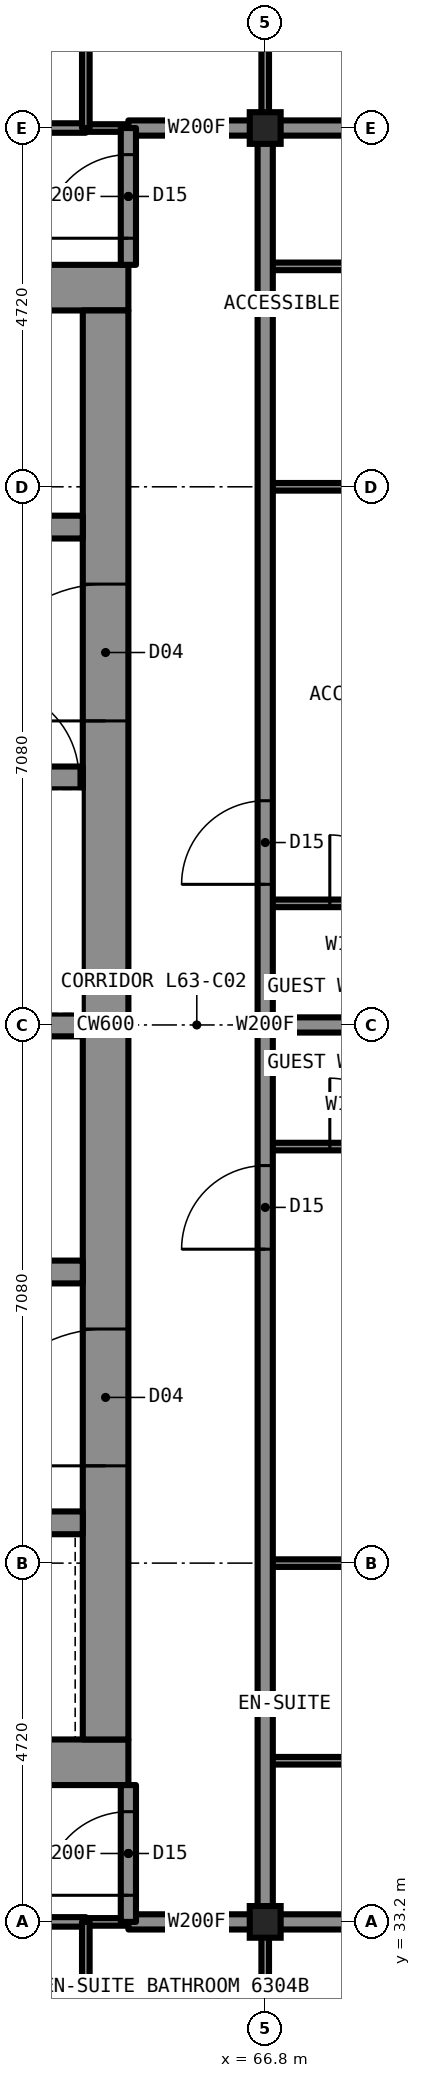
"""IFC4 building model, lengths in metres.
Left out: names, types, materials, properties, quantities, classifications, styles, units other than length and angle.
Written with IfcOpenShell. Run it as: python <this file> out.ifc"""

import sys

from ifc_helpers import new_model, si_unit, direction, frame, frame_2d, origin, origin_2d, place, context, subcontext, project, spatial, rectangle, i_section, extrude, element, fill, save


model = new_model("IFC4")
c1 = context("Model", 3, precision=1e-05, world=origin(), true_north=direction((0.0, 1.0)))
c2 = subcontext(c1, "Body", "Model", "MODEL_VIEW")
j1 = project(units=[si_unit("LENGTHUNIT", "METRE"), si_unit("PLANEANGLEUNIT", "RADIAN")], contexts=[c1])
p1 = place(None, origin())
s1 = spatial("IfcSite", under=j1, at=p1, CompositionType="ELEMENT")
p2 = place(p1, origin())
s2 = spatial("IfcBuilding", under=s1, at=p2, CompositionType="ELEMENT")
p3 = place(p2, frame((0.0, 0.0, 226.7)))
s3 = spatial("IfcBuildingStorey", under=s2, at=p3, CompositionType="ELEMENT", Elevation=226.7)
for number, where, z_axis, x_axis in (
    (1, (66.8, 33.2, 0.0), (0.0, 0.0, 1.0), (1.0, 0.0, 0.0)),
    (2, (66.8, 56.8, 0.0), (0.0, 0.0, 1.0), (1.0, 0.0, 0.0)),
):
    element("IfcColumn", number, at=place(p3, frame(where, z_axis=z_axis, x_axis=x_axis)), inside=s3, PredefinedType="COLUMN", context=c2, shape_type="SweptSolid", body=[
        extrude(i_section(OverallWidth=0.406, OverallDepth=0.417, WebThickness=0.03, FlangeThickness=0.048, at=origin_2d()), origin(), (0.0, 0.0, 1.0), 3.5),
    ])
for number, where, z_axis, x_axis in (
    (3, (45.0, 54.7, 0.0), (0.0, 0.0, 1.0), (1.0, 0.0, 0.0)),
    (4, (45.0, 35.3, 0.0), (0.0, 0.0, 1.0), (1.0, 0.0, 0.0)),
):
    element("IfcWall", number, at=place(p3, frame(where, z_axis=z_axis, x_axis=x_axis)), inside=s3, PredefinedType="SHEAR", context=c2, shape_type="SweptSolid", body=[
        extrude(rectangle(XDim=20.0, YDim=0.6, at=frame_2d((10.0, 0.0))), origin(), (0.0, 0.0, 1.0), 3.5),
    ])
p4 = place(p3, frame((64.7, 35.6, 0.0), z_axis=(0.0, 0.0, 1.0), x_axis=(0.0, 1.0, 0.0)))
e5 = element("IfcWall", 5, at=p4, inside=s3, PredefinedType="SHEAR", context=c2, shape_type="SweptSolid", body=[
    extrude(rectangle(XDim=18.8, YDim=0.6, at=frame_2d((9.4, 0.0))), origin(), (0.0, 0.0, 1.0), 3.5),
])
p5 = place(p4, frame((13.4, 0.0, 0.0)))
e6 = element("IfcOpeningElement", 6, at=p5, cuts=e5, PredefinedType="OPENING", context=c2, shape_type="SweptSolid", body=[
    extrude(rectangle(XDim=1.8, YDim=2.2, at=frame_2d((0.9, 1.1))), frame((0.0, 0.31, 0.0), z_axis=(0.0, -1.0, 0.0), x_axis=(1.0, 0.0, 0.0)), (0.0, 0.0, 1.0), 0.62),
])
p6 = place(p4, frame((3.6, 0.0, 0.0)))
e7 = element("IfcOpeningElement", 7, at=p6, cuts=e5, PredefinedType="OPENING", context=c2, shape_type="SweptSolid", body=[
    extrude(rectangle(XDim=1.8, YDim=2.2, at=frame_2d((0.9, 1.1))), frame((0.0, 0.31, 0.0), z_axis=(0.0, -1.0, 0.0), x_axis=(1.0, 0.0, 0.0)), (0.0, 0.0, 1.0), 0.62),
])
p7 = place(p3, frame((45.6, 51.55, 0.0), z_axis=(0.0, 0.0, 1.0), x_axis=(1.0, 0.0, 0.0)))
e8 = element("IfcWall", 8, at=p7, inside=s3, PredefinedType="SHEAR", context=c2, shape_type="SweptSolid", body=[
    extrude(rectangle(XDim=18.8, YDim=0.3, at=frame_2d((9.4, 0.0))), origin(), (0.0, 0.0, 1.0), 3.5),
])
p8 = place(p7, frame((4.8, 0.0, 0.0)))
e9 = element("IfcOpeningElement", 9, at=p8, cuts=e8, PredefinedType="OPENING", context=c2, shape_type="SweptSolid", body=[
    extrude(rectangle(XDim=1.0, YDim=2.1, at=frame_2d((0.5, 1.05))), frame((0.0, 0.16, 0.0), z_axis=(0.0, -1.0, 0.0), x_axis=(1.0, 0.0, 0.0)), (0.0, 0.0, 1.0), 0.32),
])
p9 = place(p7, frame((11.6, 0.0, 0.0)))
e10 = element("IfcOpeningElement", 10, at=p9, cuts=e8, PredefinedType="OPENING", context=c2, shape_type="SweptSolid", body=[
    extrude(rectangle(XDim=1.1, YDim=2.2, at=frame_2d((0.55, 1.1))), frame((0.0, 0.16, 0.0), z_axis=(0.0, -1.0, 0.0), x_axis=(1.0, 0.0, 0.0)), (0.0, 0.0, 1.0), 0.32),
])
p10 = place(p7, frame((14.3, 0.0, 0.0)))
e11 = element("IfcOpeningElement", 11, at=p10, cuts=e8, PredefinedType="OPENING", context=c2, shape_type="SweptSolid", body=[
    extrude(rectangle(XDim=1.1, YDim=2.2, at=frame_2d((0.55, 1.1))), frame((0.0, 0.16, 0.0), z_axis=(0.0, -1.0, 0.0), x_axis=(1.0, 0.0, 0.0)), (0.0, 0.0, 1.0), 0.32),
])
p11 = place(p3, frame((45.6, 38.45, 0.0), z_axis=(0.0, 0.0, 1.0), x_axis=(1.0, 0.0, 0.0)))
e12 = element("IfcWall", 12, at=p11, inside=s3, PredefinedType="SHEAR", context=c2, shape_type="SweptSolid", body=[
    extrude(rectangle(XDim=18.8, YDim=0.3, at=frame_2d((9.4, 0.0))), origin(), (0.0, 0.0, 1.0), 3.5),
])
p12 = place(p11, frame((0.7, 0.0, 0.0)))
e13 = element("IfcOpeningElement", 13, at=p12, cuts=e12, PredefinedType="OPENING", context=c2, shape_type="SweptSolid", body=[
    extrude(rectangle(XDim=1.1, YDim=2.2, at=frame_2d((0.55, 1.1))), frame((0.0, 0.16, 0.0), z_axis=(0.0, -1.0, 0.0), x_axis=(1.0, 0.0, 0.0)), (0.0, 0.0, 1.0), 0.32),
])
p13 = place(p11, frame((3.4, 0.0, 0.0)))
e14 = element("IfcOpeningElement", 14, at=p13, cuts=e12, PredefinedType="OPENING", context=c2, shape_type="SweptSolid", body=[
    extrude(rectangle(XDim=1.1, YDim=2.2, at=frame_2d((0.55, 1.1))), frame((0.0, 0.16, 0.0), z_axis=(0.0, -1.0, 0.0), x_axis=(1.0, 0.0, 0.0)), (0.0, 0.0, 1.0), 0.32),
])
p14 = place(p11, frame((6.1, 0.0, 0.0)))
e15 = element("IfcOpeningElement", 15, at=p14, cuts=e12, PredefinedType="OPENING", context=c2, shape_type="SweptSolid", body=[
    extrude(rectangle(XDim=1.1, YDim=2.2, at=frame_2d((0.55, 1.1))), frame((0.0, 0.16, 0.0), z_axis=(0.0, -1.0, 0.0), x_axis=(1.0, 0.0, 0.0)), (0.0, 0.0, 1.0), 0.32),
])
p15 = place(p11, frame((8.8, 0.0, 0.0)))
e16 = element("IfcOpeningElement", 16, at=p15, cuts=e12, PredefinedType="OPENING", context=c2, shape_type="SweptSolid", body=[
    extrude(rectangle(XDim=1.1, YDim=2.2, at=frame_2d((0.55, 1.1))), frame((0.0, 0.16, 0.0), z_axis=(0.0, -1.0, 0.0), x_axis=(1.0, 0.0, 0.0)), (0.0, 0.0, 1.0), 0.32),
])
p16 = place(p3, frame((56.2, 48.25, 0.0), z_axis=(0.0, 0.0, 1.0), x_axis=(1.0, 0.0, 0.0)))
e17 = element("IfcWall", 17, at=p16, inside=s3, PredefinedType="SHEAR", context=c2, shape_type="SweptSolid", body=[
    extrude(rectangle(XDim=8.2, YDim=0.3, at=frame_2d((4.1, 0.0))), origin(), (0.0, 0.0, 1.0), 3.5),
])
p17 = place(p16, frame((6.95, 0.0, 0.0)))
e18 = element("IfcOpeningElement", 18, at=p17, cuts=e17, PredefinedType="OPENING", context=c2, shape_type="SweptSolid", body=[
    extrude(rectangle(XDim=1.2, YDim=2.2, at=frame_2d((0.6, 1.1))), frame((0.0, 0.16, 0.0), z_axis=(0.0, -1.0, 0.0), x_axis=(1.0, 0.0, 0.0)), (0.0, 0.0, 1.0), 0.32),
])
p18 = place(p3, frame((56.2, 41.75, 0.0), z_axis=(0.0, 0.0, 1.0), x_axis=(1.0, 0.0, 0.0)))
e19 = element("IfcWall", 19, at=p18, inside=s3, PredefinedType="SHEAR", context=c2, shape_type="SweptSolid", body=[
    extrude(rectangle(XDim=8.2, YDim=0.3, at=frame_2d((4.1, 0.0))), origin(), (0.0, 0.0, 1.0), 3.5),
])
p19 = place(p18, frame((3.3, 0.0, 0.0)))
e20 = element("IfcOpeningElement", 20, at=p19, cuts=e19, PredefinedType="OPENING", context=c2, shape_type="SweptSolid", body=[
    extrude(rectangle(XDim=1.0, YDim=2.1, at=frame_2d((0.5, 1.05))), frame((0.0, 0.16, 0.0), z_axis=(0.0, -1.0, 0.0), x_axis=(1.0, 0.0, 0.0)), (0.0, 0.0, 1.0), 0.32),
])
p20 = place(p3, frame((56.5, 45.0, 0.0), z_axis=(0.0, 0.0, 1.0), x_axis=(1.0, 0.0, 0.0)))
e21 = element("IfcWall", 21, at=p20, inside=s3, PredefinedType="SHEAR", context=c2, shape_type="SweptSolid", body=[
    extrude(rectangle(XDim=7.9, YDim=0.3, at=frame_2d((3.95, 0.0))), origin(), (0.0, 0.0, 1.0), 3.5),
])
p21 = place(p3, frame((66.8, 43.4, 0.0), z_axis=(0.0, 0.0, 1.0), x_axis=(1.0, 0.0, 0.0)))
e22 = element("IfcWall", 22, at=p21, inside=s3, PredefinedType="PARTITIONING", context=c2, shape_type="SweptSolid", body=[
    extrude(rectangle(XDim=2.2, YDim=0.1, at=frame_2d((1.1, 0.0))), origin(), (0.0, 0.0, 1.0), 3.33),
])
p22 = place(p21, frame((0.85, 0.0, 0.0)))
e23 = element("IfcOpeningElement", 23, at=p22, cuts=e22, PredefinedType="OPENING", context=c2, shape_type="SweptSolid", body=[
    extrude(rectangle(XDim=0.9, YDim=2.1, at=frame_2d((0.45, 1.05))), frame((0.0, 0.06, 0.0), z_axis=(0.0, -1.0, 0.0), x_axis=(1.0, 0.0, 0.0)), (0.0, 0.0, 1.0), 0.12),
])
p23 = place(p3, frame((64.44, 33.2, 0.0), z_axis=(0.0, 0.0, 1.0), x_axis=(1.0, 0.0, 0.0)))
e24 = element("IfcWall", 24, at=p23, inside=s3, PredefinedType="PARTITIONING", context=c2, shape_type="SweptSolid", body=[
    extrude(rectangle(XDim=0.56, YDim=0.1, at=frame_2d((0.28, 0.0))), origin(), (0.0, 0.0, 1.0), 3.33),
])
p24 = place(p3, frame((65.0, 33.2, 0.0), z_axis=(0.0, 0.0, 1.0), x_axis=(1.0, 0.0, 0.0)))
e25 = element("IfcWall", 25, at=p24, inside=s3, PredefinedType="PARTITIONING", context=c2, shape_type="SweptSolid", body=[
    extrude(rectangle(XDim=1.8, YDim=0.2, at=frame_2d((0.9, 0.0))), origin(), (0.0, 0.0, 1.0), 3.33),
])
p25 = place(p3, frame((66.8, 33.2, 0.0), z_axis=(0.0, 0.0, 1.0), x_axis=(1.0, 0.0, 0.0)))
e26 = element("IfcWall", 26, at=p25, inside=s3, PredefinedType="PARTITIONING", context=c2, shape_type="SweptSolid", body=[
    extrude(rectangle(XDim=5.9, YDim=0.2, at=frame_2d((2.95, 0.0))), origin(), (0.0, 0.0, 1.0), 2.573),
])
p26 = place(p3, frame((56.6, 33.2, 0.0), z_axis=(0.0, 0.0, 1.0), x_axis=(1.0, 0.0, 0.0)))
e27 = element("IfcWall", 27, at=p26, inside=s3, PredefinedType="PARTITIONING", context=c2, shape_type="SweptSolid", body=[
    extrude(rectangle(XDim=7.84, YDim=0.125, at=frame_2d((3.92, 0.0))), origin(), (0.0, 0.0, 1.0), 3.33),
])
p27 = place(p26, frame((3.45, 0.0, 0.0)))
e28 = element("IfcOpeningElement", 28, at=p27, cuts=e27, PredefinedType="OPENING", context=c2, shape_type="SweptSolid", body=[
    extrude(rectangle(XDim=0.9, YDim=2.2, at=frame_2d((0.45, 1.1))), frame((0.0, 0.073, 0.0), z_axis=(0.0, -1.0, 0.0), x_axis=(1.0, 0.0, 0.0)), (0.0, 0.0, 1.0), 0.145),
])
p28 = place(p3, frame((66.8, 37.92, 0.0), z_axis=(0.0, 0.0, 1.0), x_axis=(1.0, 0.0, 0.0)))
e29 = element("IfcWall", 29, at=p28, inside=s3, PredefinedType="PARTITIONING", context=c2, shape_type="SweptSolid", body=[
    extrude(rectangle(XDim=2.8, YDim=0.1, at=frame_2d((1.4, 0.0))), origin(), (0.0, 0.0, 1.0), 2.573),
])
p29 = place(p3, frame((66.8, 35.32, 0.0), z_axis=(0.0, 0.0, 1.0), x_axis=(1.0, 0.0, 0.0)))
e30 = element("IfcWall", 30, at=p29, inside=s3, PredefinedType="PARTITIONING", context=c2, shape_type="SweptSolid", body=[
    extrude(rectangle(XDim=2.8, YDim=0.1, at=frame_2d((1.4, 0.0))), origin(), (0.0, 0.0, 1.0), 3.33),
])
p30 = place(p3, frame((66.8, 45.0, 0.0), z_axis=(0.0, 0.0, 1.0), x_axis=(1.0, 0.0, 0.0)))
e31 = element("IfcWall", 31, at=p30, inside=s3, PredefinedType="PARTITIONING", context=c2, shape_type="SweptSolid", body=[
    extrude(rectangle(XDim=5.9, YDim=0.2, at=frame_2d((2.95, 0.0))), origin(), (0.0, 0.0, 1.0), 2.797),
])
p31 = place(p3, frame((66.8, 46.6, 0.0), z_axis=(0.0, 0.0, 1.0), x_axis=(1.0, 0.0, 0.0)))
e32 = element("IfcWall", 32, at=p31, inside=s3, PredefinedType="PARTITIONING", context=c2, shape_type="SweptSolid", body=[
    extrude(rectangle(XDim=2.2, YDim=0.1, at=frame_2d((1.1, 0.0))), origin(), (0.0, 0.0, 1.0), 3.33),
])
p32 = place(p31, frame((0.85, 0.0, 0.0)))
e33 = element("IfcOpeningElement", 33, at=p32, cuts=e32, PredefinedType="OPENING", context=c2, shape_type="SweptSolid", body=[
    extrude(rectangle(XDim=0.9, YDim=2.1, at=frame_2d((0.45, 1.05))), frame((0.0, 0.06, 0.0), z_axis=(0.0, -1.0, 0.0), x_axis=(1.0, 0.0, 0.0)), (0.0, 0.0, 1.0), 0.12),
])
p33 = place(p3, frame((64.44, 56.8, 0.0), z_axis=(0.0, 0.0, 1.0), x_axis=(1.0, 0.0, 0.0)))
e34 = element("IfcWall", 34, at=p33, inside=s3, PredefinedType="PARTITIONING", context=c2, shape_type="SweptSolid", body=[
    extrude(rectangle(XDim=0.56, YDim=0.1, at=frame_2d((0.28, 0.0))), origin(), (0.0, 0.0, 1.0), 3.33),
])
p34 = place(p3, frame((65.0, 56.8, 0.0), z_axis=(0.0, 0.0, 1.0), x_axis=(1.0, 0.0, 0.0)))
e35 = element("IfcWall", 35, at=p34, inside=s3, PredefinedType="PARTITIONING", context=c2, shape_type="SweptSolid", body=[
    extrude(rectangle(XDim=1.8, YDim=0.2, at=frame_2d((0.9, 0.0))), origin(), (0.0, 0.0, 1.0), 3.33),
])
p35 = place(p3, frame((66.8, 56.8, 0.0), z_axis=(0.0, 0.0, 1.0), x_axis=(1.0, 0.0, 0.0)))
e36 = element("IfcWall", 36, at=p35, inside=s3, PredefinedType="PARTITIONING", context=c2, shape_type="SweptSolid", body=[
    extrude(rectangle(XDim=5.9, YDim=0.2, at=frame_2d((2.95, 0.0))), origin(), (0.0, 0.0, 1.0), 2.573),
])
p36 = place(p3, frame((56.6, 56.8, 0.0), z_axis=(0.0, 0.0, 1.0), x_axis=(1.0, 0.0, 0.0)))
e37 = element("IfcWall", 37, at=p36, inside=s3, PredefinedType="PARTITIONING", context=c2, shape_type="SweptSolid", body=[
    extrude(rectangle(XDim=7.84, YDim=0.125, at=frame_2d((3.92, 0.0))), origin(), (0.0, 0.0, 1.0), 3.33),
])
p37 = place(p36, frame((3.45, 0.0, 0.0)))
e38 = element("IfcOpeningElement", 38, at=p37, cuts=e37, PredefinedType="OPENING", context=c2, shape_type="SweptSolid", body=[
    extrude(rectangle(XDim=0.9, YDim=2.2, at=frame_2d((0.45, 1.1))), frame((0.0, 0.073, 0.0), z_axis=(0.0, -1.0, 0.0), x_axis=(1.0, 0.0, 0.0)), (0.0, 0.0, 1.0), 0.145),
])
p38 = place(p3, frame((66.8, 52.08, 0.0), z_axis=(0.0, 0.0, 1.0), x_axis=(1.0, 0.0, 0.0)))
e39 = element("IfcWall", 39, at=p38, inside=s3, PredefinedType="PARTITIONING", context=c2, shape_type="SweptSolid", body=[
    extrude(rectangle(XDim=3.0, YDim=0.1, at=frame_2d((1.5, 0.0))), origin(), (0.0, 0.0, 1.0), 2.573),
])
p39 = place(p3, frame((66.8, 54.98, 0.0), z_axis=(0.0, 0.0, 1.0), x_axis=(1.0, 0.0, 0.0)))
e40 = element("IfcWall", 40, at=p39, inside=s3, PredefinedType="PARTITIONING", context=c2, shape_type="SweptSolid", body=[
    extrude(rectangle(XDim=3.0, YDim=0.1, at=frame_2d((1.5, 0.0))), origin(), (0.0, 0.0, 1.0), 3.33),
])
p40 = place(p3, frame((65.0, 33.2, 0.0), z_axis=(0.0, 0.0, 1.0), x_axis=(0.0, 1.0, 0.0)))
e41 = element("IfcWall", 41, at=p40, inside=s3, PredefinedType="PARTITIONING", context=c2, shape_type="SweptSolid", body=[
    extrude(rectangle(XDim=1.8, YDim=0.2, at=frame_2d((0.9, 0.0))), origin(), (0.0, 0.0, 1.0), 3.33),
])
p41 = place(p40, frame((0.35, 0.0, 0.0)))
e42 = element("IfcOpeningElement", 42, at=p41, cuts=e41, PredefinedType="OPENING", context=c2, shape_type="SweptSolid", body=[
    extrude(rectangle(XDim=1.1, YDim=2.2, at=frame_2d((0.55, 1.1))), frame((0.0, 0.11, 0.0), z_axis=(0.0, -1.0, 0.0), x_axis=(1.0, 0.0, 0.0)), (0.0, 0.0, 1.0), 0.22),
])
p42 = place(p3, frame((65.0, 55.0, 0.0), z_axis=(0.0, 0.0, 1.0), x_axis=(0.0, 1.0, 0.0)))
e43 = element("IfcWall", 43, at=p42, inside=s3, PredefinedType="PARTITIONING", context=c2, shape_type="SweptSolid", body=[
    extrude(rectangle(XDim=1.8, YDim=0.2, at=frame_2d((0.9, 0.0))), origin(), (0.0, 0.0, 1.0), 3.33),
])
p43 = place(p42, frame((0.35, 0.0, 0.0)))
e44 = element("IfcOpeningElement", 44, at=p43, cuts=e43, PredefinedType="OPENING", context=c2, shape_type="SweptSolid", body=[
    extrude(rectangle(XDim=1.1, YDim=2.2, at=frame_2d((0.55, 1.1))), frame((0.0, 0.11, 0.0), z_axis=(0.0, -1.0, 0.0), x_axis=(1.0, 0.0, 0.0)), (0.0, 0.0, 1.0), 0.22),
])
for number, where, z_axis, x_axis in (
    (45, (66.8, 30.4, 0.0), (0.0, 0.0, 1.0), (0.0, 1.0, 0.0)),
    (46, (66.8, 56.8, 0.0), (0.0, 0.0, 1.0), (0.0, 1.0, 0.0)),
):
    element("IfcWall", number, at=place(p3, frame(where, z_axis=z_axis, x_axis=x_axis)), inside=s3, PredefinedType="PARTITIONING", context=c2, shape_type="SweptSolid", body=[
        extrude(rectangle(XDim=2.8, YDim=0.1, at=frame_2d((1.4, 0.0))), origin(), (0.0, 0.0, 1.0), 2.573),
    ])
p44 = place(p3, frame((66.8, 33.2, 0.0), z_axis=(0.0, 0.0, 1.0), x_axis=(0.0, 1.0, 0.0)))
e47 = element("IfcWall", 47, at=p44, inside=s3, PredefinedType="PARTITIONING", context=c2, shape_type="SweptSolid", body=[
    extrude(rectangle(XDim=23.6, YDim=0.2, at=frame_2d((11.8, 0.0))), origin(), (0.0, 0.0, 1.0), 3.33),
])
p45 = place(p44, frame((8.85, 0.0, 0.0)))
e48 = element("IfcOpeningElement", 48, at=p45, cuts=e47, PredefinedType="OPENING", context=c2, shape_type="SweptSolid", body=[
    extrude(rectangle(XDim=1.1, YDim=2.2, at=frame_2d((0.55, 1.1))), frame((0.0, 0.11, 0.0), z_axis=(0.0, -1.0, 0.0), x_axis=(1.0, 0.0, 0.0)), (0.0, 0.0, 1.0), 0.22),
])
p46 = place(p44, frame((13.65, 0.0, 0.0)))
e49 = element("IfcOpeningElement", 49, at=p46, cuts=e47, PredefinedType="OPENING", context=c2, shape_type="SweptSolid", body=[
    extrude(rectangle(XDim=1.1, YDim=2.2, at=frame_2d((0.55, 1.1))), frame((0.0, 0.11, 0.0), z_axis=(0.0, -1.0, 0.0), x_axis=(1.0, 0.0, 0.0)), (0.0, 0.0, 1.0), 0.22),
])
for number, where, z_axis, x_axis in (
    (50, (64.44, 30.4, 0.0), (0.0, 0.0, 1.0), (0.0, 1.0, 0.0)),
    (51, (64.44, 56.8, 0.0), (0.0, 0.0, 1.0), (0.0, 1.0, 0.0)),
):
    element("IfcWall", number, at=place(p3, frame(where, z_axis=z_axis, x_axis=x_axis)), inside=s3, PredefinedType="PARTITIONING", context=c2, shape_type="SweptSolid", body=[
        extrude(rectangle(XDim=2.8, YDim=0.1, at=frame_2d((1.4, 0.0))), origin(), (0.0, 0.0, 1.0), 3.33),
    ])
p47 = place(p43, origin())
e52 = element("IfcDoor", 52, at=p47, inside=s3, OperationType="SINGLE_SWING_LEFT", PredefinedType="DOOR", context=c2, shape_type="SweptSolid", body=[
    extrude(rectangle(XDim=1.1, YDim=2.2, at=frame_2d((0.55, 1.1))), frame((0.0, 0.025, 0.0), z_axis=(0.0, -1.0, 0.0), x_axis=(1.0, 0.0, 0.0)), (0.0, 0.0, 1.0), 0.05),
])
fill(e44, e52)
p48 = place(p41, origin())
e53 = element("IfcDoor", 53, at=p48, inside=s3, OperationType="SINGLE_SWING_LEFT", PredefinedType="DOOR", context=c2, shape_type="SweptSolid", body=[
    extrude(rectangle(XDim=1.1, YDim=2.2, at=frame_2d((0.55, 1.1))), frame((0.0, 0.025, 0.0), z_axis=(0.0, -1.0, 0.0), x_axis=(1.0, 0.0, 0.0)), (0.0, 0.0, 1.0), 0.05),
])
fill(e42, e53)
p49 = place(p45, origin())
e54 = element("IfcDoor", 54, at=p49, inside=s3, OperationType="SINGLE_SWING_LEFT", PredefinedType="DOOR", context=c2, shape_type="SweptSolid", body=[
    extrude(rectangle(XDim=1.1, YDim=2.2, at=frame_2d((0.55, 1.1))), frame((0.0, 0.025, 0.0), z_axis=(0.0, -1.0, 0.0), x_axis=(1.0, 0.0, 0.0)), (0.0, 0.0, 1.0), 0.05),
])
fill(e48, e54)
p50 = place(p22, origin())
e55 = element("IfcDoor", 55, at=p50, inside=s3, OperationType="SINGLE_SWING_LEFT", PredefinedType="DOOR", context=c2, shape_type="SweptSolid", body=[
    extrude(rectangle(XDim=0.9, YDim=2.1, at=frame_2d((0.45, 1.05))), frame((0.0, 0.025, 0.0), z_axis=(0.0, -1.0, 0.0), x_axis=(1.0, 0.0, 0.0)), (0.0, 0.0, 1.0), 0.05),
])
fill(e23, e55)
p51 = place(p46, origin())
e56 = element("IfcDoor", 56, at=p51, inside=s3, OperationType="SINGLE_SWING_LEFT", PredefinedType="DOOR", context=c2, shape_type="SweptSolid", body=[
    extrude(rectangle(XDim=1.1, YDim=2.2, at=frame_2d((0.55, 1.1))), frame((0.0, 0.025, 0.0), z_axis=(0.0, -1.0, 0.0), x_axis=(1.0, 0.0, 0.0)), (0.0, 0.0, 1.0), 0.05),
])
fill(e49, e56)
p52 = place(p32, origin())
e57 = element("IfcDoor", 57, at=p52, inside=s3, OperationType="SINGLE_SWING_LEFT", PredefinedType="DOOR", context=c2, shape_type="SweptSolid", body=[
    extrude(rectangle(XDim=0.9, YDim=2.1, at=frame_2d((0.45, 1.05))), frame((0.0, 0.025, 0.0), z_axis=(0.0, -1.0, 0.0), x_axis=(1.0, 0.0, 0.0)), (0.0, 0.0, 1.0), 0.05),
])
fill(e33, e57)
p53 = place(p5, origin())
e58 = element("IfcDoor", 58, at=p53, inside=s3, OperationType="DOUBLE_DOOR_SINGLE_SWING", PredefinedType="DOOR", context=c2, shape_type="SweptSolid", body=[
    extrude(rectangle(XDim=1.8, YDim=2.2, at=frame_2d((0.9, 1.1))), frame((0.0, 0.025, 0.0), z_axis=(0.0, -1.0, 0.0), x_axis=(1.0, 0.0, 0.0)), (0.0, 0.0, 1.0), 0.05),
])
fill(e6, e58)
p54 = place(p6, origin())
e59 = element("IfcDoor", 59, at=p54, inside=s3, OperationType="DOUBLE_DOOR_SINGLE_SWING", PredefinedType="DOOR", context=c2, shape_type="SweptSolid", body=[
    extrude(rectangle(XDim=1.8, YDim=2.2, at=frame_2d((0.9, 1.1))), frame((0.0, 0.025, 0.0), z_axis=(0.0, -1.0, 0.0), x_axis=(1.0, 0.0, 0.0)), (0.0, 0.0, 1.0), 0.05),
])
fill(e7, e59)
p55 = place(p17, origin())
e60 = element("IfcDoor", 60, at=p55, inside=s3, OperationType="SINGLE_SWING_LEFT", PredefinedType="DOOR", context=c2, shape_type="SweptSolid", body=[
    extrude(rectangle(XDim=1.2, YDim=2.2, at=frame_2d((0.6, 1.1))), frame((0.0, 0.025, 0.0), z_axis=(0.0, -1.0, 0.0), x_axis=(1.0, 0.0, 0.0)), (0.0, 0.0, 1.0), 0.05),
])
fill(e18, e60)
save(model, sys.argv[1])
